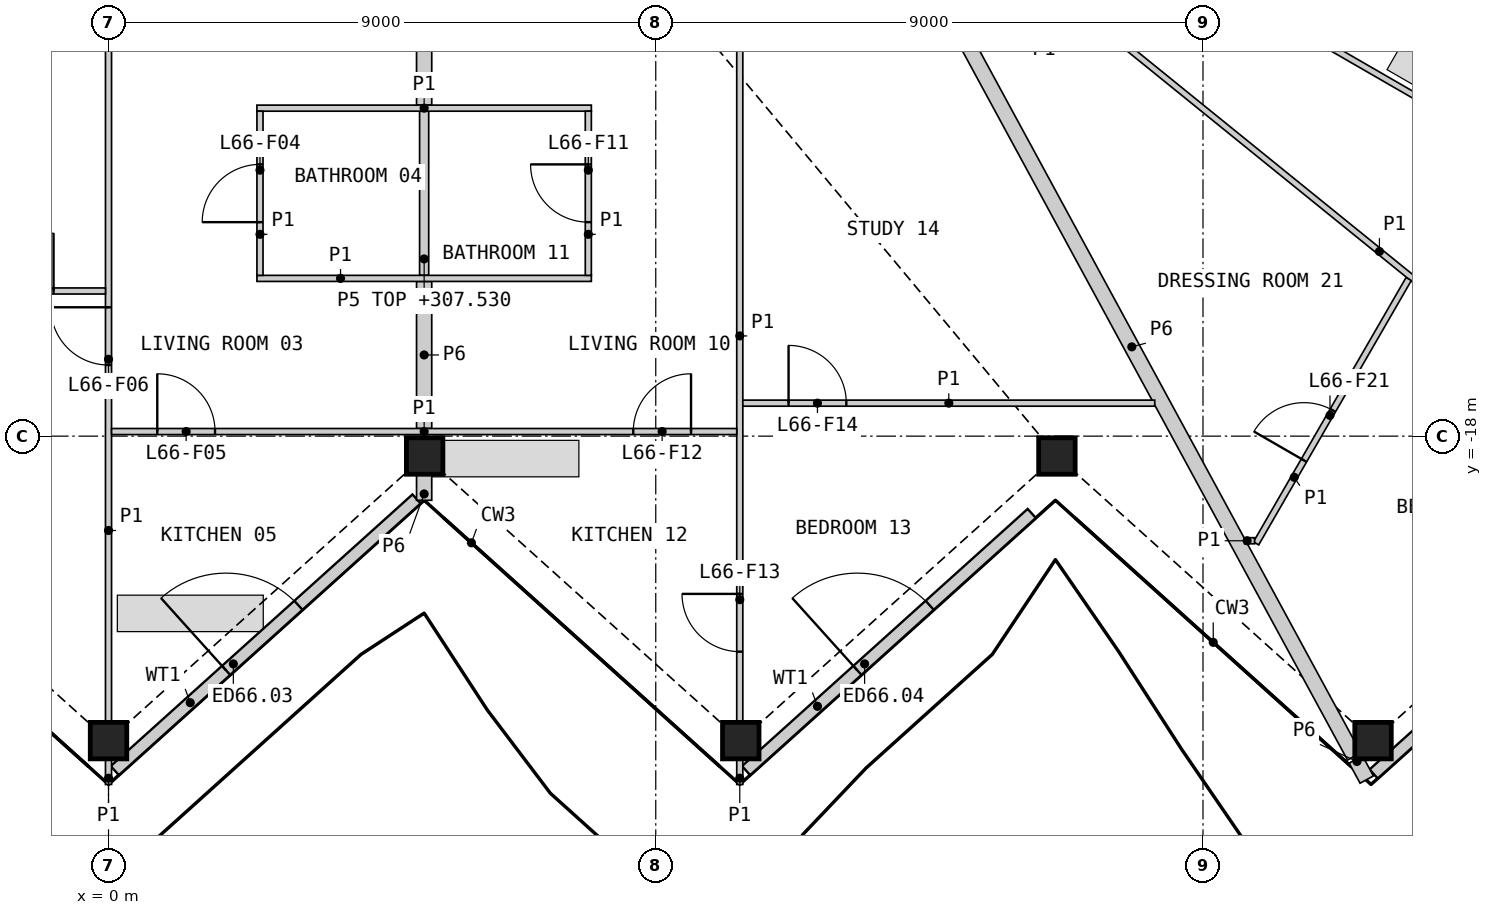
"""IFC4 building model, lengths in metres.
Left out: names, types, materials, properties, quantities, classifications, styles, units other than length and angle.
Written with IfcOpenShell. Run it as: python <this file> out.ifc"""

import sys

from ifc_helpers import new_model, si_unit, direction, frame, frame_2d, origin, origin_2d, place, context, subcontext, project, spatial, rectangle, hollow_rectangle, extrude, element, fill, save


model = new_model("IFC4")
c1 = context("Model", 3, precision=1e-05, world=origin(), true_north=direction((0.0, 1.0)))
c2 = subcontext(c1, "Body", "Model", "MODEL_VIEW")
j1 = project(units=[si_unit("LENGTHUNIT", "METRE"), si_unit("PLANEANGLEUNIT", "RADIAN")], contexts=[c1])
p1 = place(None, origin())
s1 = spatial("IfcSite", under=j1, at=p1, CompositionType="ELEMENT")
p2 = place(p1, origin())
s2 = spatial("IfcBuilding", under=s1, at=p2, CompositionType="ELEMENT")
p3 = place(p2, frame((0.0, 0.0, 305.2)))
s3 = spatial("IfcBuildingStorey", under=s2, at=p3, CompositionType="ELEMENT", Elevation=305.2)
for number, where, z_axis, x_axis in (
    (1, (0.0, -23.008, 0.0), (0.0, 0.0, 1.0), (1.0, 0.0, 0.0)),
    (2, (5.199, -18.327, 0.0), (0.0, 0.0, 1.0), (1.0, 0.0, 0.0)),
    (3, (10.398, -23.008, 0.0), (0.0, 0.0, 1.0), (1.0, 0.0, 0.0)),
    (4, (15.597, -18.327, 0.0), (0.0, 0.0, 1.0), (1.0, 0.0, 0.0)),
    (5, (20.796, -23.008, 0.0), (0.0, 0.0, 1.0), (1.0, 0.0, 0.0)),
):
    element("IfcColumn", number, at=place(p3, frame(where, z_axis=z_axis, x_axis=x_axis)), inside=s3, PredefinedType="COLUMN", context=c2, shape_type="SweptSolid", body=[
        extrude(hollow_rectangle(XDim=0.6, YDim=0.6, WallThickness=0.04, at=origin_2d()), origin(), (0.0, 0.0, 1.0), 3.4),
    ])
p4 = place(p3, frame((0.104, -23.501, 0.0), z_axis=(0.0, 0.0, 1.0), x_axis=(0.743137782456, 0.669138428344, 0.0)))
e6 = element("IfcWall", 6, at=p4, inside=s3, PredefinedType="SOLIDWALL", context=c2, shape_type="SweptSolid", body=[
    extrude(rectangle(XDim=6.678, YDim=0.2, at=frame_2d((3.339, 0.0))), origin(), (0.0, 0.0, 1.0), 2.488),
])
p5 = place(p4, frame((2.463, 0.0, 0.0)))
e7 = element("IfcOpeningElement", 7, at=p5, cuts=e6, PredefinedType="OPENING", context=c2, shape_type="SweptSolid", body=[
    extrude(rectangle(XDim=1.6, YDim=2.25, at=frame_2d((0.8, 1.125))), frame((0.0, 0.11, 0.0), z_axis=(0.0, -1.0, 0.0), x_axis=(1.0, 0.0, 0.0)), (0.0, 0.0, 1.0), 0.22),
])
p6 = place(p3, frame((10.485, -23.501, 0.0), z_axis=(0.0, 0.0, 1.0), x_axis=(0.743134744054, 0.669141802745, 0.0)))
e8 = element("IfcWall", 8, at=p6, inside=s3, PredefinedType="SOLIDWALL", context=c2, shape_type="SweptSolid", body=[
    extrude(rectangle(XDim=6.322, YDim=0.2, at=frame_2d((3.161, 0.0))), origin(), (0.0, 0.0, 1.0), 2.488),
])
p7 = place(p6, frame((2.463, 0.0, 0.0)))
e9 = element("IfcOpeningElement", 9, at=p7, cuts=e8, PredefinedType="OPENING", context=c2, shape_type="SweptSolid", body=[
    extrude(rectangle(XDim=1.6, YDim=2.25, at=frame_2d((0.8, 1.125))), frame((0.0, 0.11, 0.0), z_axis=(0.0, -1.0, 0.0), x_axis=(1.0, 0.0, 0.0)), (0.0, 0.0, 1.0), 0.22),
])
p8 = place(p3, frame((20.806, -23.556, 0.0), z_axis=(0.0, 0.0, 1.0), x_axis=(0.743145048269, 0.669130358924, 0.0)))
e10 = element("IfcWall", 10, at=p8, inside=s3, PredefinedType="SOLIDWALL", context=c2, shape_type="SweptSolid", body=[
    extrude(rectangle(XDim=6.759, YDim=0.2, at=frame_2d((3.379, 0.0))), origin(), (0.0, 0.0, 1.0), 2.488),
])
p9 = place(p8, frame((2.545, 0.0, 0.0)))
e11 = element("IfcOpeningElement", 11, at=p9, cuts=e10, PredefinedType="OPENING", context=c2, shape_type="SweptSolid", body=[
    extrude(rectangle(XDim=1.6, YDim=2.25, at=frame_2d((0.8, 1.125))), frame((0.0, 0.11, 0.0), z_axis=(0.0, -1.0, 0.0), x_axis=(1.0, 0.0, 0.0)), (0.0, 0.0, 1.0), 0.22),
])
p10 = place(p3, frame((13.171, -9.796, 0.0), z_axis=(0.0, 0.0, 1.0), x_axis=(0.477178668135, -0.878806303275, 0.0)))
e12 = element("IfcWall", 12, at=p10, inside=s3, PredefinedType="PARTITIONING", context=c2, shape_type="SweptSolid", body=[
    extrude(rectangle(XDim=15.33, YDim=0.25, at=frame_2d((7.665, 0.0))), origin(), (0.0, 0.0, 1.0), 2.33),
])
p11 = place(p3, frame((5.191, -12.556, 0.0), z_axis=(0.0, 0.0, 1.0), x_axis=(0.0, 1.0, 0.0)))
e13 = element("IfcWall", 13, at=p11, inside=s3, PredefinedType="PARTITIONING", context=c2, shape_type="SweptSolid", body=[
    extrude(rectangle(XDim=2.55, YDim=0.25, at=frame_2d((1.275, 0.0))), origin(), (0.0, 0.0, 1.0), 2.33),
])
p12 = place(p3, frame((5.191, -17.875, 0.0), z_axis=(0.0, 0.0, 1.0), x_axis=(0.0, 1.0, 0.0)))
e14 = element("IfcWall", 14, at=p12, inside=s3, PredefinedType="PARTITIONING", context=c2, shape_type="SweptSolid", body=[
    extrude(rectangle(XDim=2.419, YDim=0.25, at=frame_2d((1.209, 0.0))), origin(), (0.0, 0.0, 1.0), 2.33),
])
p13 = place(p3, frame((5.191, -19.055, 0.0), z_axis=(0.0, 0.0, 1.0), x_axis=(0.0, 1.0, 0.0)))
e15 = element("IfcWall", 15, at=p13, inside=s3, PredefinedType="PARTITIONING", context=c2, shape_type="SweptSolid", body=[
    extrude(rectangle(XDim=0.418, YDim=0.25, at=frame_2d((0.209, 0.0))), origin(), (0.0, 0.0, 1.0), 2.33),
])
p14 = place(p3, frame((20.514, -23.318, 0.0), z_axis=(0.0, 0.0, 1.0), x_axis=(0.477077538769, -0.878861207474, 0.0)))
e16 = element("IfcWall", 16, at=p14, inside=s3, PredefinedType="PARTITIONING", context=c2, shape_type="SweptSolid", body=[
    extrude(rectangle(XDim=0.376, YDim=0.25, at=frame_2d((0.188, 0.0))), origin(), (0.0, 0.0, 1.0), 2.33),
])
p15 = place(p3, frame((5.191, -15.356, 0.0), z_axis=(0.0, 0.0, 1.0), x_axis=(0.0, 1.0, 0.0)))
e17 = element("IfcWall", 17, at=p15, inside=s3, PredefinedType="PLUMBINGWALL", context=c2, shape_type="SweptSolid", body=[
    extrude(rectangle(XDim=2.7, YDim=0.15, at=frame_2d((1.35, 0.0))), origin(), (0.0, 0.0, 1.0), 2.33),
])
p16 = place(p3, frame((15.848, -10.871, 0.0), z_axis=(0.0, 0.0, 1.0), x_axis=(0.77713687197, -0.629331615465, 0.0)))
e18 = element("IfcWall", 18, at=p16, inside=s3, PredefinedType="PARTITIONING", context=c2, shape_type="SweptSolid", body=[
    extrude(rectangle(XDim=13.004, YDim=0.1, at=frame_2d((6.502, 0.0))), origin(), (0.0, 0.0, 1.0), 2.33),
])
p17 = place(p16, frame((7.384, 0.0, 0.0)))
e19 = element("IfcOpeningElement", 19, at=p17, cuts=e18, PredefinedType="OPENING", context=c2, shape_type="SweptSolid", body=[
    extrude(rectangle(XDim=0.95, YDim=2.1, at=frame_2d((0.475, 1.05))), frame((0.0, 0.06, 0.0), z_axis=(0.0, -1.0, 0.0), x_axis=(1.0, 0.0, 0.0)), (0.0, 0.0, 1.0), 0.12),
])
p18 = place(p3, frame((10.382, -22.698, 0.0), z_axis=(0.0, 0.0, 1.0), x_axis=(0.0, 1.0, 0.0)))
e20 = element("IfcWall", 20, at=p18, inside=s3, PredefinedType="PARTITIONING", context=c2, shape_type="SweptSolid", body=[
    extrude(rectangle(XDim=12.692, YDim=0.1, at=frame_2d((6.346, 0.0))), origin(), (0.0, 0.0, 1.0), 2.33),
])
p19 = place(p18, frame((1.153, 0.0, 0.0)))
e21 = element("IfcOpeningElement", 21, at=p19, cuts=e20, PredefinedType="OPENING", context=c2, shape_type="SweptSolid", body=[
    extrude(rectangle(XDim=0.95, YDim=2.1, at=frame_2d((0.475, 1.05))), frame((0.0, 0.06, 0.0), z_axis=(0.0, -1.0, 0.0), x_axis=(1.0, 0.0, 0.0)), (0.0, 0.0, 1.0), 0.12),
])
p20 = place(p3, frame((0.0, -22.698, 0.0), z_axis=(0.0, 0.0, 1.0), x_axis=(0.0, 1.0, 0.0)))
e22 = element("IfcWall", 22, at=p20, inside=s3, PredefinedType="PARTITIONING", context=c2, shape_type="SweptSolid", body=[
    extrude(rectangle(XDim=12.585, YDim=0.1, at=frame_2d((6.292, 0.0))), origin(), (0.0, 0.0, 1.0), 2.33),
])
p21 = place(p20, frame((5.868, 0.0, 0.0)))
e23 = element("IfcOpeningElement", 23, at=p21, cuts=e22, PredefinedType="OPENING", context=c2, shape_type="SweptSolid", body=[
    extrude(rectangle(XDim=0.95, YDim=2.1, at=frame_2d((0.475, 1.05))), frame((0.0, 0.06, 0.0), z_axis=(0.0, -1.0, 0.0), x_axis=(1.0, 0.0, 0.0)), (0.0, 0.0, 1.0), 0.12),
])
p22 = place(p3, frame((17.365, -10.025, 0.0), z_axis=(0.0, 0.0, 1.0), x_axis=(0.866021046153, -0.500007547564, 0.0)))
e24 = element("IfcWall", 24, at=p22, inside=s3, PredefinedType="PARTITIONING", context=c2, shape_type="SweptSolid", body=[
    extrude(rectangle(XDim=11.267, YDim=0.1, at=frame_2d((5.634, 0.0))), origin(), (0.0, 0.0, 1.0), 2.33),
])
p23 = place(p22, frame((8.364, 0.0, 0.0)))
e25 = element("IfcOpeningElement", 25, at=p23, cuts=e24, PredefinedType="OPENING", context=c2, shape_type="SweptSolid", body=[
    extrude(rectangle(XDim=0.95, YDim=2.1, at=frame_2d((0.475, 1.05))), frame((0.0, 0.06, 0.0), z_axis=(0.0, -1.0, 0.0), x_axis=(1.0, 0.0, 0.0)), (0.0, 0.0, 1.0), 0.12),
])
p24 = place(p3, frame((0.05, -17.924, 0.0), z_axis=(0.0, 0.0, 1.0), x_axis=(1.0, 0.0, 0.0)))
e26 = element("IfcWall", 26, at=p24, inside=s3, PredefinedType="PARTITIONING", context=c2, shape_type="SweptSolid", body=[
    extrude(rectangle(XDim=10.282, YDim=0.1, at=frame_2d((5.141, 0.0))), origin(), (0.0, 0.0, 1.0), 2.33),
])
p25 = place(p24, frame((0.752, 0.0, 0.0)))
e27 = element("IfcOpeningElement", 27, at=p25, cuts=e26, PredefinedType="OPENING", context=c2, shape_type="SweptSolid", body=[
    extrude(rectangle(XDim=0.95, YDim=2.1, at=frame_2d((0.475, 1.05))), frame((0.0, 0.06, 0.0), z_axis=(0.0, -1.0, 0.0), x_axis=(1.0, 0.0, 0.0)), (0.0, 0.0, 1.0), 0.12),
])
p26 = place(p24, frame((8.58, 0.0, 0.0)))
e28 = element("IfcOpeningElement", 28, at=p26, cuts=e26, PredefinedType="OPENING", context=c2, shape_type="SweptSolid", body=[
    extrude(rectangle(XDim=0.95, YDim=2.1, at=frame_2d((0.475, 1.05))), frame((0.0, 0.06, 0.0), z_axis=(0.0, -1.0, 0.0), x_axis=(1.0, 0.0, 0.0)), (0.0, 0.0, 1.0), 0.12),
])
p27 = place(p3, frame((-10.257, -15.613, 0.0), z_axis=(0.0, 0.0, 1.0), x_axis=(1.0, 0.0, 0.0)))
e29 = element("IfcWall", 29, at=p27, inside=s3, PredefinedType="PARTITIONING", context=c2, shape_type="SweptSolid", body=[
    extrude(rectangle(XDim=10.207, YDim=0.1, at=frame_2d((5.104, 0.0))), origin(), (0.0, 0.0, 1.0), 2.33),
])
p28 = place(p27, frame((8.403, 0.0, 0.0)))
e30 = element("IfcOpeningElement", 30, at=p28, cuts=e29, PredefinedType="OPENING", context=c2, shape_type="SweptSolid", body=[
    extrude(rectangle(XDim=0.95, YDim=2.1, at=frame_2d((0.475, 1.05))), frame((0.0, 0.06, 0.0), z_axis=(0.0, -1.0, 0.0), x_axis=(1.0, 0.0, 0.0)), (0.0, 0.0, 1.0), 0.12),
])
p29 = place(p27, frame((0.653, 0.0, 0.0)))
e31 = element("IfcOpeningElement", 31, at=p29, cuts=e29, PredefinedType="OPENING", context=c2, shape_type="SweptSolid", body=[
    extrude(rectangle(XDim=0.95, YDim=2.1, at=frame_2d((0.475, 1.05))), frame((0.0, 0.06, 0.0), z_axis=(0.0, -1.0, 0.0), x_axis=(1.0, 0.0, 0.0)), (0.0, 0.0, 1.0), 0.12),
])
p30 = place(p3, frame((10.432, -17.458, 0.0), z_axis=(0.0, 0.0, 1.0), x_axis=(1.0, 0.0, 0.0)))
e32 = element("IfcWall", 32, at=p30, inside=s3, PredefinedType="PARTITIONING", context=c2, shape_type="SweptSolid", body=[
    extrude(rectangle(XDim=6.775, YDim=0.1, at=frame_2d((3.387, 0.0))), origin(), (0.0, 0.0, 1.0), 2.33),
])
p31 = place(p30, frame((0.752, 0.0, 0.0)))
e33 = element("IfcOpeningElement", 33, at=p31, cuts=e32, PredefinedType="OPENING", context=c2, shape_type="SweptSolid", body=[
    extrude(rectangle(XDim=0.95, YDim=2.1, at=frame_2d((0.475, 1.05))), frame((0.0, 0.06, 0.0), z_axis=(0.0, -1.0, 0.0), x_axis=(1.0, 0.0, 0.0)), (0.0, 0.0, 1.0), 0.12),
])
for number, where, z_axis, x_axis in (
    (34, (2.441, -12.606, 0.0), (0.0, 0.0, 1.0), (1.0, 0.0, 0.0)),
    (35, (2.441, -15.406, 0.0), (0.0, 0.0, 1.0), (1.0, 0.0, 0.0)),
):
    element("IfcWall", number, at=place(p3, frame(where, z_axis=z_axis, x_axis=x_axis)), inside=s3, PredefinedType="PARTITIONING", context=c2, shape_type="SweptSolid", body=[
        extrude(rectangle(XDim=5.5, YDim=0.1, at=frame_2d((2.75, 0.0))), origin(), (0.0, 0.0, 1.0), 2.33),
    ])
p32 = place(p3, frame((18.873, -19.764, 0.0), z_axis=(0.0, 0.0, 1.0), x_axis=(0.499983455602, 0.866034955486, 0.0)))
e36 = element("IfcWall", 36, at=p32, inside=s3, PredefinedType="PARTITIONING", context=c2, shape_type="SweptSolid", body=[
    extrude(rectangle(XDim=5.02, YDim=0.1, at=frame_2d((2.51, 0.0))), origin(), (0.0, 0.0, 1.0), 2.33),
])
p33 = place(p32, frame((1.576, 0.0, 0.0)))
e37 = element("IfcOpeningElement", 37, at=p33, cuts=e36, PredefinedType="OPENING", context=c2, shape_type="SweptSolid", body=[
    extrude(rectangle(XDim=0.95, YDim=2.1, at=frame_2d((0.475, 1.05))), frame((0.0, 0.06, 0.0), z_axis=(0.0, -1.0, 0.0), x_axis=(1.0, 0.0, 0.0)), (0.0, 0.0, 1.0), 0.12),
])
p34 = place(p3, frame((2.491, -15.356, 0.0), z_axis=(0.0, 0.0, 1.0), x_axis=(0.0, 1.0, 0.0)))
e38 = element("IfcWall", 38, at=p34, inside=s3, PredefinedType="PARTITIONING", context=c2, shape_type="SweptSolid", body=[
    extrude(rectangle(XDim=2.7, YDim=0.1, at=frame_2d((1.35, 0.0))), origin(), (0.0, 0.0, 1.0), 2.33),
])
p35 = place(p34, frame((0.875, 0.0, 0.0)))
e39 = element("IfcOpeningElement", 39, at=p35, cuts=e38, PredefinedType="OPENING", context=c2, shape_type="SweptSolid", body=[
    extrude(rectangle(XDim=0.95, YDim=2.1, at=frame_2d((0.475, 1.05))), frame((0.0, 0.06, 0.0), z_axis=(0.0, -1.0, 0.0), x_axis=(1.0, 0.0, 0.0)), (0.0, 0.0, 1.0), 0.12),
])
p36 = place(p3, frame((7.891, -15.356, 0.0), z_axis=(0.0, 0.0, 1.0), x_axis=(0.0, 1.0, 0.0)))
e40 = element("IfcWall", 40, at=p36, inside=s3, PredefinedType="PARTITIONING", context=c2, shape_type="SweptSolid", body=[
    extrude(rectangle(XDim=2.7, YDim=0.1, at=frame_2d((1.35, 0.0))), origin(), (0.0, 0.0, 1.0), 2.33),
])
p37 = place(p36, frame((0.875, 0.0, 0.0)))
e41 = element("IfcOpeningElement", 41, at=p37, cuts=e40, PredefinedType="OPENING", context=c2, shape_type="SweptSolid", body=[
    extrude(rectangle(XDim=0.95, YDim=2.1, at=frame_2d((0.475, 1.05))), frame((0.0, 0.06, 0.0), z_axis=(0.0, -1.0, 0.0), x_axis=(1.0, 0.0, 0.0)), (0.0, 0.0, 1.0), 0.12),
])
for number, where, z_axis, x_axis in (
    (42, (0.0, -23.729, 0.0), (0.0, 0.0, 1.0), (0.0, 1.0, 0.0)),
    (43, (10.382, -23.729, 0.0), (0.0, 0.0, 1.0), (0.0, 1.0, 0.0)),
):
    element("IfcWall", number, at=place(p3, frame(where, z_axis=z_axis, x_axis=x_axis)), inside=s3, PredefinedType="PARTITIONING", context=c2, shape_type="SweptSolid", body=[
        extrude(rectangle(XDim=0.411, YDim=0.1, at=frame_2d((0.206, 0.0))), origin(), (0.0, 0.0, 1.0), 2.33),
    ])
p38 = place(p3, frame((18.685, -19.721, 0.0), z_axis=(0.0, 0.0, 1.0), x_axis=(1.0, 0.0, 0.0)))
e44 = element("IfcWall", 44, at=p38, inside=s3, PredefinedType="PARTITIONING", context=c2, shape_type="SweptSolid", body=[
    extrude(rectangle(XDim=0.162, YDim=0.1, at=frame_2d((0.081, 0.0))), origin(), (0.0, 0.0, 1.0), 2.33),
])
p39 = place(p5, origin())
e45 = element("IfcDoor", 45, at=p39, inside=s3, OperationType="DOUBLE_DOOR_SINGLE_SWING", PredefinedType="DOOR", context=c2, shape_type="SweptSolid", body=[
    extrude(rectangle(XDim=1.6, YDim=2.25, at=frame_2d((0.8, 1.125))), frame((0.0, 0.025, 0.0), z_axis=(0.0, -1.0, 0.0), x_axis=(1.0, 0.0, 0.0)), (0.0, 0.0, 1.0), 0.05),
])
fill(e7, e45)
p40 = place(p7, origin())
e46 = element("IfcDoor", 46, at=p40, inside=s3, OperationType="DOUBLE_DOOR_SINGLE_SWING", PredefinedType="DOOR", context=c2, shape_type="SweptSolid", body=[
    extrude(rectangle(XDim=1.6, YDim=2.25, at=frame_2d((0.8, 1.125))), frame((0.0, 0.025, 0.0), z_axis=(0.0, -1.0, 0.0), x_axis=(1.0, 0.0, 0.0)), (0.0, 0.0, 1.0), 0.05),
])
fill(e9, e46)
p41 = place(p35, origin())
e47 = element("IfcDoor", 47, at=p41, inside=s3, OperationType="SINGLE_SWING_LEFT", PredefinedType="DOOR", context=c2, shape_type="SweptSolid", body=[
    extrude(rectangle(XDim=0.95, YDim=2.1, at=frame_2d((0.475, 1.05))), frame((0.0, 0.025, 0.0), z_axis=(0.0, -1.0, 0.0), x_axis=(1.0, 0.0, 0.0)), (0.0, 0.0, 1.0), 0.05),
])
fill(e39, e47)
p42 = place(p25, origin())
e48 = element("IfcDoor", 48, at=p42, inside=s3, OperationType="SINGLE_SWING_LEFT", PredefinedType="DOOR", context=c2, shape_type="SweptSolid", body=[
    extrude(rectangle(XDim=0.95, YDim=2.1, at=frame_2d((0.475, 1.05))), frame((0.0, 0.025, 0.0), z_axis=(0.0, -1.0, 0.0), x_axis=(1.0, 0.0, 0.0)), (0.0, 0.0, 1.0), 0.05),
])
fill(e27, e48)
p43 = place(p21, origin())
e49 = element("IfcDoor", 49, at=p43, inside=s3, OperationType="SINGLE_SWING_RIGHT", PredefinedType="DOOR", context=c2, shape_type="SweptSolid", body=[
    extrude(rectangle(XDim=0.95, YDim=2.1, at=frame_2d((0.475, 1.05))), frame((0.0, 0.025, 0.0), z_axis=(0.0, -1.0, 0.0), x_axis=(1.0, 0.0, 0.0)), (0.0, 0.0, 1.0), 0.05),
])
fill(e23, e49)
p44 = place(p28, origin())
e50 = element("IfcDoor", 50, at=p44, inside=s3, OperationType="SINGLE_SWING_RIGHT", PredefinedType="DOOR", context=c2, shape_type="SweptSolid", body=[
    extrude(rectangle(XDim=0.95, YDim=2.1, at=frame_2d((0.475, 1.05))), frame((0.0, 0.025, 0.0), z_axis=(0.0, -1.0, 0.0), x_axis=(1.0, 0.0, 0.0)), (0.0, 0.0, 1.0), 0.05),
])
fill(e30, e50)
p45 = place(p37, origin())
e51 = element("IfcDoor", 51, at=p45, inside=s3, OperationType="SINGLE_SWING_RIGHT", PredefinedType="DOOR", context=c2, shape_type="SweptSolid", body=[
    extrude(rectangle(XDim=0.95, YDim=2.1, at=frame_2d((0.475, 1.05))), frame((0.0, 0.025, 0.0), z_axis=(0.0, -1.0, 0.0), x_axis=(1.0, 0.0, 0.0)), (0.0, 0.0, 1.0), 0.05),
])
fill(e41, e51)
p46 = place(p26, origin())
e52 = element("IfcDoor", 52, at=p46, inside=s3, OperationType="SINGLE_SWING_RIGHT", PredefinedType="DOOR", context=c2, shape_type="SweptSolid", body=[
    extrude(rectangle(XDim=0.95, YDim=2.1, at=frame_2d((0.475, 1.05))), frame((0.0, 0.025, 0.0), z_axis=(0.0, -1.0, 0.0), x_axis=(1.0, 0.0, 0.0)), (0.0, 0.0, 1.0), 0.05),
])
fill(e28, e52)
p47 = place(p19, origin())
e53 = element("IfcDoor", 53, at=p47, inside=s3, OperationType="SINGLE_SWING_RIGHT", PredefinedType="DOOR", context=c2, shape_type="SweptSolid", body=[
    extrude(rectangle(XDim=0.95, YDim=2.1, at=frame_2d((0.475, 1.05))), frame((0.0, 0.025, 0.0), z_axis=(0.0, -1.0, 0.0), x_axis=(1.0, 0.0, 0.0)), (0.0, 0.0, 1.0), 0.05),
])
fill(e21, e53)
p48 = place(p31, origin())
e54 = element("IfcDoor", 54, at=p48, inside=s3, OperationType="SINGLE_SWING_LEFT", PredefinedType="DOOR", context=c2, shape_type="SweptSolid", body=[
    extrude(rectangle(XDim=0.95, YDim=2.1, at=frame_2d((0.475, 1.05))), frame((0.0, 0.025, 0.0), z_axis=(0.0, -1.0, 0.0), x_axis=(1.0, 0.0, 0.0)), (0.0, 0.0, 1.0), 0.05),
])
fill(e33, e54)
p49 = place(p33, origin())
e55 = element("IfcDoor", 55, at=p49, inside=s3, OperationType="SINGLE_SWING_LEFT", PredefinedType="DOOR", context=c2, shape_type="SweptSolid", body=[
    extrude(rectangle(XDim=0.95, YDim=2.1, at=frame_2d((0.475, 1.05))), frame((0.0, 0.025, 0.0), z_axis=(0.0, -1.0, 0.0), x_axis=(1.0, 0.0, 0.0)), (0.0, 0.0, 1.0), 0.05),
])
fill(e37, e55)
save(model, sys.argv[1])
